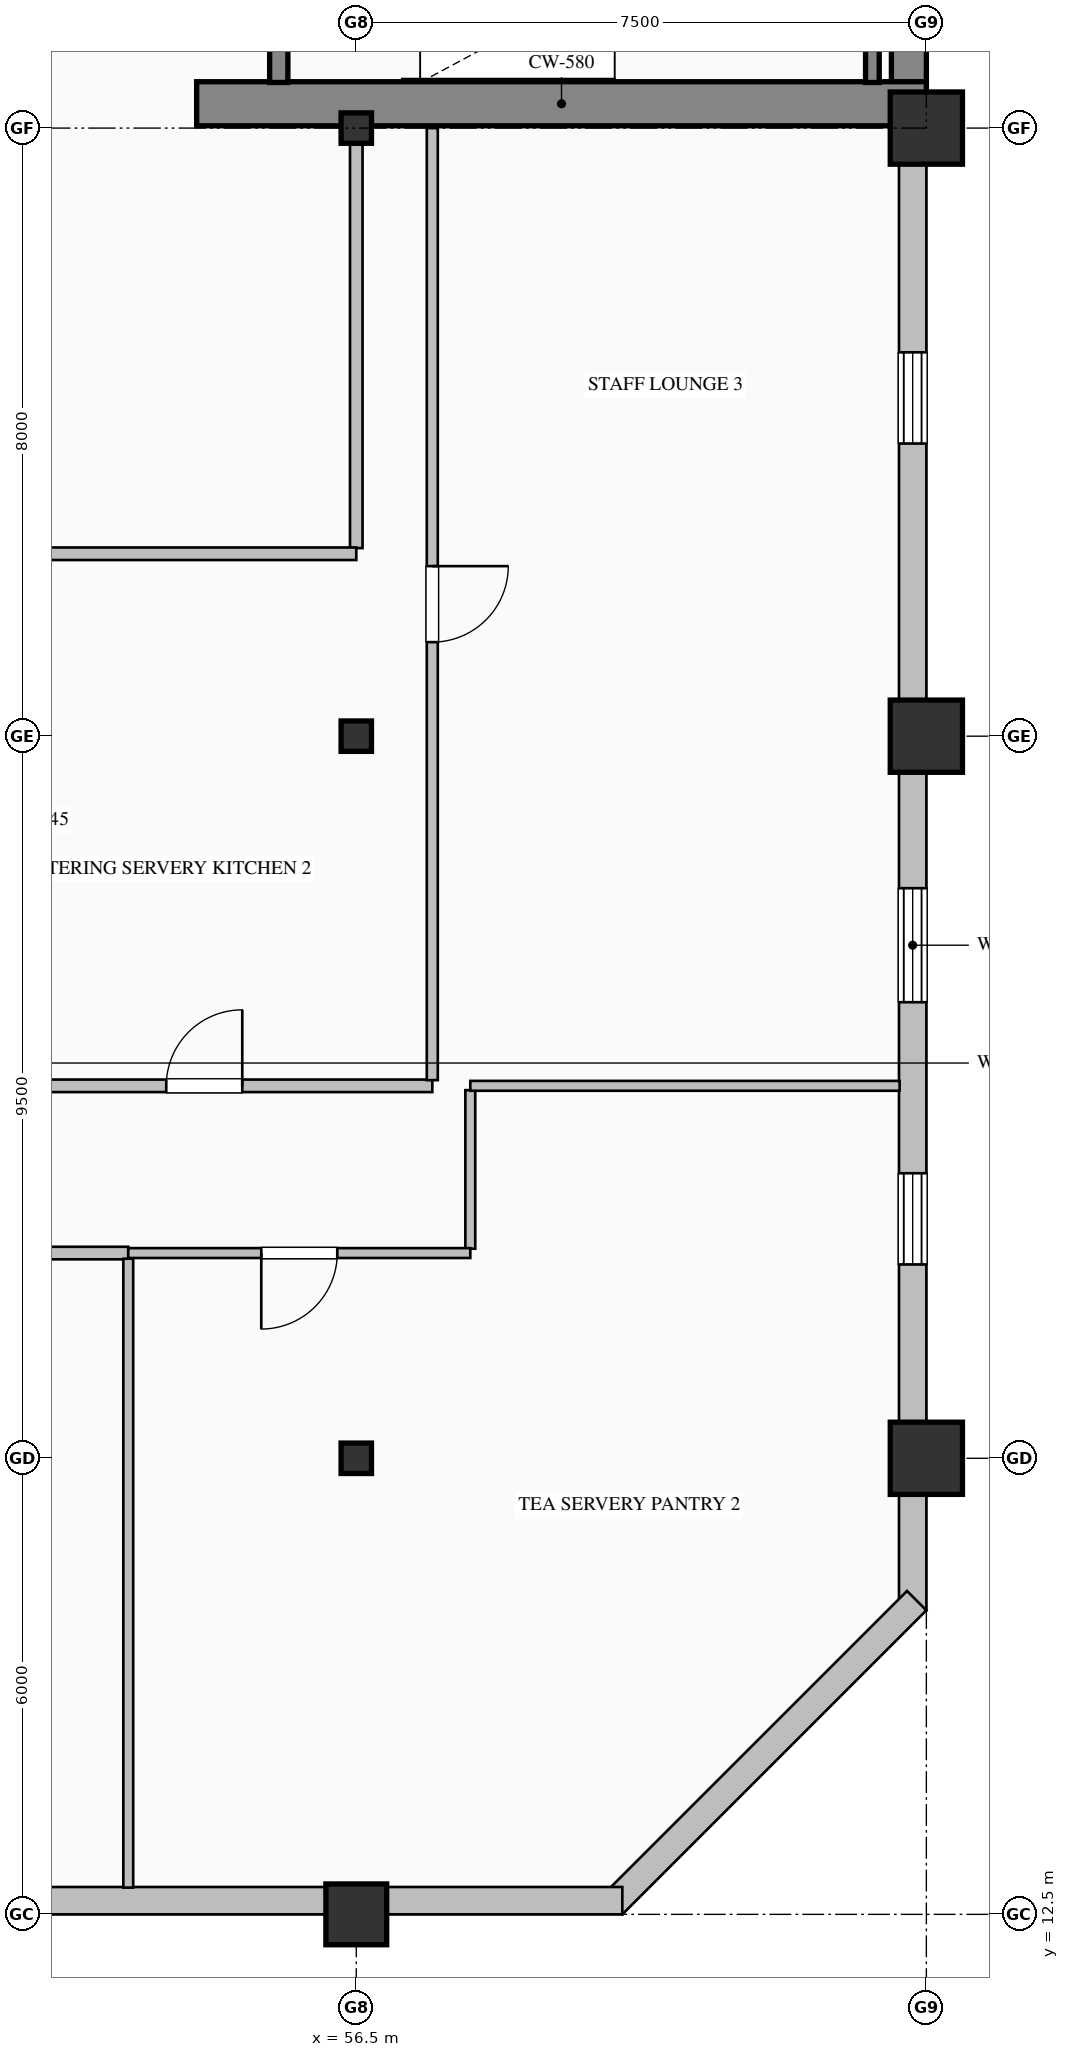
"""IFC4 building model, lengths in metres.
Left out: names, types, materials, properties, quantities, classifications, styles, units other than length and angle.
Written with IfcOpenShell. Run it as: python <this file> out.ifc"""

import sys

from ifc_helpers import new_model, si_unit, direction, frame, frame_2d, origin, origin_2d, place, context, subcontext, project, spatial, rectangle, hollow_rectangle, i_section, extrude, element, fill, save


model = new_model("IFC4")
c1 = context("Model", 3, precision=1e-05, world=origin(), true_north=direction((0.0, 1.0)))
c2 = subcontext(c1, "Body", "Model", "MODEL_VIEW")
j1 = project(units=[si_unit("LENGTHUNIT", "METRE"), si_unit("PLANEANGLEUNIT", "RADIAN")], contexts=[c1])
p1 = place(None, origin())
s1 = spatial("IfcSite", under=j1, at=p1, CompositionType="ELEMENT")
p2 = place(p1, origin())
s2 = spatial("IfcBuilding", under=s1, at=p2, CompositionType="ELEMENT")
p3 = place(p2, frame((0.0, 0.0, 249.8)))
s3 = spatial("IfcBuildingStorey", under=s2, at=p3, CompositionType="ELEMENT", Elevation=249.8)
p4 = place(p3, frame((63.77, 36.32, 0.0), z_axis=(0.0, 0.0, 1.0), x_axis=(0.0, 1.0, 0.0)))
e1 = element("IfcWall", 1, at=p4, inside=s3, PredefinedType="SHEAR", context=c2, shape_type="SweptSolid", body=[
    extrude(rectangle(XDim=15.22, YDim=0.46, at=frame_2d((7.61, 0.0))), origin(), (0.0, 0.0, 1.0), 3.775),
])
p5 = place(p3, frame((54.4, 36.32, 0.0), z_axis=(0.0, 0.0, 1.0), x_axis=(1.0, 0.0, 0.0)))
e2 = element("IfcWall", 2, at=p5, inside=s3, PredefinedType="SHEAR", context=c2, shape_type="SweptSolid", body=[
    extrude(rectangle(XDim=9.6, YDim=0.58, at=frame_2d((4.8, 0.0))), origin(), (0.0, 0.0, 1.0), 4.0),
])
p6 = place(p3, frame((56.5, 12.5, 0.0), z_axis=(0.0, 0.0, 1.0), x_axis=(1.0, 0.0, 0.0)))
e3 = element("IfcColumn", 3, at=p6, inside=s3, PredefinedType="COLUMN", context=c2, shape_type="SweptSolid", body=[
    extrude(hollow_rectangle(XDim=0.8, YDim=0.8, WallThickness=0.032, at=origin_2d()), origin(), (0.0, 0.0, 1.0), 4.0),
])
for number, where, z_axis, x_axis in (
    (4, (56.5, 18.5, 0.0), (0.0, 0.0, 1.0), (1.0, 0.0, 0.0)),
    (5, (56.5, 28.0, 0.0), (0.0, 0.0, 1.0), (1.0, 0.0, 0.0)),
    (6, (56.5, 36.0, 0.0), (0.0, 0.0, 1.0), (1.0, 0.0, 0.0)),
):
    element("IfcColumn", number, at=place(p3, frame(where, z_axis=z_axis, x_axis=x_axis)), inside=s3, PredefinedType="COLUMN", context=c2, shape_type="SweptSolid", body=[
        extrude(i_section(OverallWidth=0.4, OverallDepth=0.4, WebThickness=0.013, FlangeThickness=0.021, FilletRadius=0.022, at=origin_2d()), origin(), (0.0, 0.0, 1.0), 4.0),
    ])
for number, where, z_axis, x_axis in (
    (7, (64.0, 18.5, 0.0), (0.0, 0.0, 1.0), (1.0, 0.0, 0.0)),
    (8, (64.0, 28.0, 0.0), (0.0, 0.0, 1.0), (1.0, 0.0, 0.0)),
    (9, (64.0, 36.0, 0.0), (0.0, 0.0, 1.0), (1.0, 0.0, 0.0)),
):
    element("IfcColumn", number, at=place(p3, frame(where, z_axis=z_axis, x_axis=x_axis)), inside=s3, PredefinedType="COLUMN", context=c2, shape_type="SweptSolid", body=[
        extrude(hollow_rectangle(XDim=0.95, YDim=0.95, WallThickness=0.036, at=origin_2d()), origin(), (0.0, 0.0, 1.0), 4.0),
    ])
p7 = place(p3, frame((63.82, 36.05, 0.0), z_axis=(0.0, 0.0, 1.0), x_axis=(0.0, -1.0, 0.0)))
e10 = element("IfcWall", 10, at=p7, inside=s3, PredefinedType="SOLIDWALL", context=c2, shape_type="SweptSolid", body=[
    extrude(rectangle(XDim=19.55, YDim=0.36, at=frame_2d((9.775, 0.0))), origin(), (0.0, 0.0, 1.0), 3.325),
])
p8 = place(p7, frame((3.0, 0.0, 0.9)))
e11 = element("IfcOpeningElement", 11, at=p8, cuts=e10, PredefinedType="OPENING", context=c2, shape_type="SweptSolid", body=[
    extrude(rectangle(XDim=1.2, YDim=1.85, at=frame_2d((0.6, 0.925))), frame((0.0, 0.19, 0.0), z_axis=(0.0, -1.0, 0.0), x_axis=(1.0, 0.0, 0.0)), (0.0, 0.0, 1.0), 0.38),
])
p9 = place(p7, frame((10.05, 0.0, 0.7)))
e12 = element("IfcOpeningElement", 12, at=p9, cuts=e10, PredefinedType="OPENING", context=c2, shape_type="SweptSolid", body=[
    extrude(rectangle(XDim=1.5, YDim=2.4, at=frame_2d((0.75, 1.2))), frame((0.0, 0.19, 0.0), z_axis=(0.0, -1.0, 0.0), x_axis=(1.0, 0.0, 0.0)), (0.0, 0.0, 1.0), 0.38),
])
p10 = place(p7, frame((13.8, 0.0, 0.9)))
e13 = element("IfcOpeningElement", 13, at=p10, cuts=e10, PredefinedType="OPENING", context=c2, shape_type="SweptSolid", body=[
    extrude(rectangle(XDim=1.2, YDim=1.85, at=frame_2d((0.6, 0.925))), frame((0.0, 0.19, 0.0), z_axis=(0.0, -1.0, 0.0), x_axis=(1.0, 0.0, 0.0)), (0.0, 0.0, 1.0), 0.38),
])
p11 = place(p3, frame((63.873, 16.627, 0.0), z_axis=(0.0, 0.0, 1.0), x_axis=(-0.707106781187, -0.707106781187, 0.0)))
e14 = element("IfcWall", 14, at=p11, inside=s3, PredefinedType="SOLIDWALL", context=c2, shape_type="SweptSolid", body=[
    extrude(rectangle(XDim=5.657, YDim=0.36, at=frame_2d((2.828, 0.0))), origin(), (0.0, 0.0, 1.0), 3.775),
])
p12 = place(p3, frame((60.0, 12.68, 0.0), z_axis=(0.0, 0.0, 1.0), x_axis=(-1.0, 0.0, 0.0)))
e15 = element("IfcWall", 15, at=p12, inside=s3, PredefinedType="SOLIDWALL", context=c2, shape_type="SweptSolid", body=[
    extrude(rectangle(XDim=15.5, YDim=0.36, at=frame_2d((7.75, 0.0))), origin(), (0.0, 0.0, 1.0), 3.325),
])
p13 = place(p3, frame((55.48, 39.75, 0.0), z_axis=(0.0, 0.0, 1.0), x_axis=(0.0, -1.0, 0.0)))
e16 = element("IfcWall", 16, at=p13, inside=s3, PredefinedType="SOLIDWALL", context=c2, shape_type="SweptSolid", body=[
    extrude(rectangle(XDim=3.15, YDim=0.24, at=frame_2d((1.575, 0.0))), origin(), (0.0, 0.0, 1.0), 4.0),
])
p14 = place(p13, frame((1.0, 0.0, 0.0)))
e17 = element("IfcOpeningElement", 17, at=p14, cuts=e16, PredefinedType="OPENING", context=c2, shape_type="SweptSolid", body=[
    extrude(rectangle(XDim=1.15, YDim=2.2, at=frame_2d((0.575, 1.1))), frame((0.0, 0.13, 0.0), z_axis=(0.0, -1.0, 0.0), x_axis=(1.0, 0.0, 0.0)), (0.0, 0.0, 1.0), 0.26),
])
p15 = place(p3, frame((63.29, 36.6, 0.0), z_axis=(0.0, 0.0, 1.0), x_axis=(0.0, 1.0, 0.0)))
e18 = element("IfcWall", 18, at=p15, inside=s3, PredefinedType="SOLIDWALL", context=c2, shape_type="SweptSolid", body=[
    extrude(rectangle(XDim=3.15, YDim=0.18, at=frame_2d((1.575, 0.0))), origin(), (0.0, 0.0, 1.0), 4.0),
])
p16 = place(p3, frame((56.5, 36.0, 0.0), z_axis=(0.0, 0.0, 1.0), x_axis=(0.0, -1.0, 0.0)))
e19 = element("IfcWall", 19, at=p16, inside=s3, PredefinedType="PARTITIONING", context=c2, shape_type="SweptSolid", body=[
    extrude(rectangle(XDim=5.525, YDim=0.165, at=frame_2d((2.763, 0.0))), origin(), (0.0, 0.0, 1.0), 3.179),
])
p17 = place(p3, frame((56.5, 30.4, 0.0), z_axis=(0.0, 0.0, 1.0), x_axis=(-1.0, 0.0, 0.0)))
e20 = element("IfcWall", 20, at=p17, inside=s3, PredefinedType="PARTITIONING", context=c2, shape_type="SweptSolid", body=[
    extrude(rectangle(XDim=5.0, YDim=0.165, at=frame_2d((2.5, 0.0))), origin(), (0.0, 0.0, 1.0), 3.775),
])
p18 = place(p3, frame((51.5, 23.4, 0.0), z_axis=(0.0, 0.0, 1.0), x_axis=(1.0, 0.0, 0.0)))
e21 = element("IfcWall", 21, at=p18, inside=s3, PredefinedType="PARTITIONING", context=c2, shape_type="SweptSolid", body=[
    extrude(rectangle(XDim=6.0, YDim=0.165, at=frame_2d((3.0, 0.0))), origin(), (0.0, 0.0, 1.0), 3.467),
])
p19 = place(p18, frame((2.5, 0.0, 0.0)))
e22 = element("IfcOpeningElement", 22, at=p19, cuts=e21, PredefinedType="OPENING", context=c2, shape_type="SweptSolid", body=[
    extrude(rectangle(XDim=1.0, YDim=2.15, at=frame_2d((0.5, 1.075))), frame((0.0, 0.093, 0.0), z_axis=(0.0, -1.0, 0.0), x_axis=(1.0, 0.0, 0.0)), (0.0, 0.0, 1.0), 0.185),
])
p20 = place(p3, frame((53.5, 21.2, 0.0), z_axis=(0.0, 0.0, 1.0), x_axis=(-1.0, 0.0, 0.0)))
e23 = element("IfcWall", 23, at=p20, inside=s3, PredefinedType="PARTITIONING", context=c2, shape_type="SweptSolid", body=[
    extrude(rectangle(XDim=8.3, YDim=0.165, at=frame_2d((4.15, 0.0))), origin(), (0.0, 0.0, 1.0), 3.775),
])
p21 = place(p3, frame((58.0, 23.343, 0.0), z_axis=(0.0, 0.0, 1.0), x_axis=(0.0, -1.0, 0.0)))
e24 = element("IfcWall", 24, at=p21, inside=s3, PredefinedType="PARTITIONING", context=c2, shape_type="SweptSolid", body=[
    extrude(rectangle(XDim=2.086, YDim=0.13, at=frame_2d((1.043, 0.0))), origin(), (0.0, 0.0, 1.0), 3.775),
])
p22 = place(p3, frame((58.0, 21.2, 0.0), z_axis=(0.0, 0.0, 1.0), x_axis=(-1.0, 0.0, 0.0)))
e25 = element("IfcWall", 25, at=p22, inside=s3, PredefinedType="PARTITIONING", context=c2, shape_type="SweptSolid", body=[
    extrude(rectangle(XDim=4.5, YDim=0.13, at=frame_2d((2.25, 0.0))), origin(), (0.0, 0.0, 1.0), 3.775),
])
p23 = place(p22, frame((1.75, 0.0, 0.0)))
e26 = element("IfcOpeningElement", 26, at=p23, cuts=e25, PredefinedType="OPENING", context=c2, shape_type="SweptSolid", body=[
    extrude(rectangle(XDim=1.0, YDim=2.15, at=frame_2d((0.5, 1.075))), frame((0.0, 0.075, 0.0), z_axis=(0.0, -1.0, 0.0), x_axis=(1.0, 0.0, 0.0)), (0.0, 0.0, 1.0), 0.15),
])
p24 = place(p3, frame((57.5, 36.0, 0.0), z_axis=(0.0, 0.0, 1.0), x_axis=(0.0, -1.0, 0.0)))
e27 = element("IfcWall", 27, at=p24, inside=s3, PredefinedType="PARTITIONING", context=c2, shape_type="SweptSolid", body=[
    extrude(rectangle(XDim=12.525, YDim=0.145, at=frame_2d((6.263, 0.0))), origin(), (0.0, 0.0, 1.0), 3.775),
])
p25 = place(p24, frame((5.763, 0.0, 0.0)))
e28 = element("IfcOpeningElement", 28, at=p25, cuts=e27, PredefinedType="OPENING", context=c2, shape_type="SweptSolid", body=[
    extrude(rectangle(XDim=1.0, YDim=2.15, at=frame_2d((0.5, 1.075))), frame((0.0, 0.083, 0.0), z_axis=(0.0, -1.0, 0.0), x_axis=(1.0, 0.0, 0.0)), (0.0, 0.0, 1.0), 0.165),
])
p26 = place(p3, frame((63.648, 23.4, 0.0), z_axis=(0.0, 0.0, 1.0), x_axis=(-1.0, 0.0, 0.0)))
e29 = element("IfcWall", 29, at=p26, inside=s3, PredefinedType="PARTITIONING", context=c2, shape_type="SweptSolid", body=[
    extrude(rectangle(XDim=5.648, YDim=0.13, at=frame_2d((2.824, 0.0))), origin(), (0.0, 0.0, 1.0), 3.775),
])
p27 = place(p3, frame((53.5, 21.125, 0.0), z_axis=(0.0, 0.0, 1.0), x_axis=(0.0, -1.0, 0.0)))
e30 = element("IfcWall", 30, at=p27, inside=s3, PredefinedType="PARTITIONING", context=c2, shape_type="SweptSolid", body=[
    extrude(rectangle(XDim=8.273, YDim=0.13, at=frame_2d((4.137, 0.0))), origin(), (0.0, 0.0, 1.0), 3.775),
])
p28 = place(p8, origin())
e31 = element("IfcWindow", 31, at=p28, inside=s3, PartitioningType="DOUBLE_PANEL_VERTICAL", PredefinedType="WINDOW", context=c2, shape_type="SweptSolid", body=[
    extrude(rectangle(XDim=1.2, YDim=1.85, at=frame_2d((0.6, 0.925))), frame((0.0, 0.15, 0.0), z_axis=(0.0, -1.0, 0.0), x_axis=(1.0, 0.0, 0.0)), (0.0, 0.0, 1.0), 0.06),
])
fill(e11, e31)
p29 = place(p9, origin())
e32 = element("IfcWindow", 32, at=p29, inside=s3, PartitioningType="DOUBLE_PANEL_HORIZONTAL", PredefinedType="WINDOW", context=c2, shape_type="SweptSolid", body=[
    extrude(rectangle(XDim=1.5, YDim=2.4, at=frame_2d((0.75, 1.2))), frame((0.0, 0.15, 0.0), z_axis=(0.0, -1.0, 0.0), x_axis=(1.0, 0.0, 0.0)), (0.0, 0.0, 1.0), 0.06),
])
fill(e12, e32)
p30 = place(p10, origin())
e33 = element("IfcWindow", 33, at=p30, inside=s3, PartitioningType="DOUBLE_PANEL_VERTICAL", PredefinedType="WINDOW", context=c2, shape_type="SweptSolid", body=[
    extrude(rectangle(XDim=1.2, YDim=1.85, at=frame_2d((0.6, 0.925))), frame((0.0, 0.15, 0.0), z_axis=(0.0, -1.0, 0.0), x_axis=(1.0, 0.0, 0.0)), (0.0, 0.0, 1.0), 0.06),
])
fill(e13, e33)
p31 = place(p19, origin())
e34 = element("IfcDoor", 34, at=p31, inside=s3, OperationType="SINGLE_SWING_RIGHT", PredefinedType="DOOR", context=c2, shape_type="SweptSolid", body=[
    extrude(rectangle(XDim=1.0, YDim=2.15, at=frame_2d((0.5, 1.075))), frame((0.0, 0.025, 0.0), z_axis=(0.0, -1.0, 0.0), x_axis=(1.0, 0.0, 0.0)), (0.0, 0.0, 1.0), 0.05),
])
fill(e22, e34)
p32 = place(p25, origin())
e35 = element("IfcDoor", 35, at=p32, inside=s3, OperationType="SINGLE_SWING_LEFT", PredefinedType="DOOR", context=c2, shape_type="SweptSolid", body=[
    extrude(rectangle(XDim=1.0, YDim=2.15, at=frame_2d((0.5, 1.075))), frame((0.0, 0.025, 0.0), z_axis=(0.0, -1.0, 0.0), x_axis=(1.0, 0.0, 0.0)), (0.0, 0.0, 1.0), 0.05),
])
fill(e28, e35)
p33 = place(p23, origin())
e36 = element("IfcDoor", 36, at=p33, inside=s3, OperationType="SINGLE_SWING_RIGHT", PredefinedType="DOOR", context=c2, shape_type="SweptSolid", body=[
    extrude(rectangle(XDim=1.0, YDim=2.15, at=frame_2d((0.5, 1.075))), frame((0.0, 0.025, 0.0), z_axis=(0.0, -1.0, 0.0), x_axis=(1.0, 0.0, 0.0)), (0.0, 0.0, 1.0), 0.05),
])
fill(e26, e36)
save(model, sys.argv[1])
